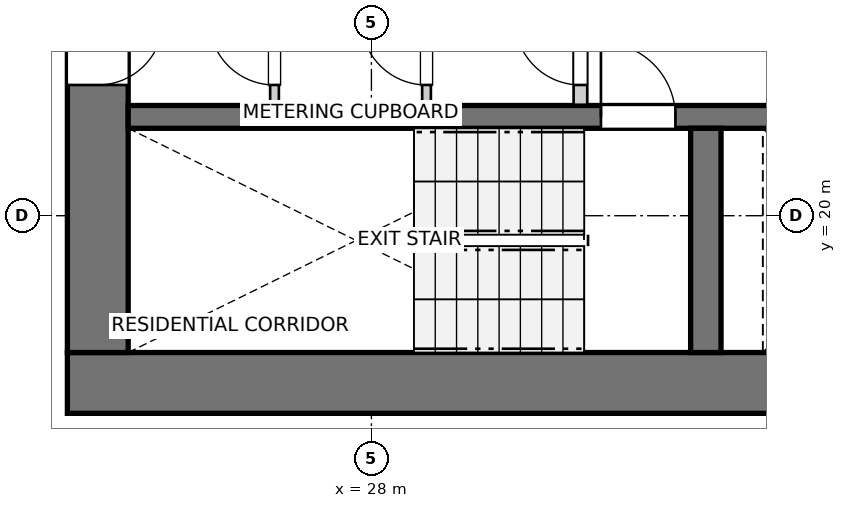
"""IFC4 building model, lengths in metres.
Left out: names, types, materials, properties, quantities, classifications, styles, units other than length and angle.
Written with IfcOpenShell. Run it as: python <this file> out.ifc"""

import sys

from ifc_helpers import new_model, si_unit, direction, frame, frame_2d, origin, place, context, subcontext, project, spatial, rectangle, extrude, source, transform, mapped, element, fill, save


model = new_model("IFC4")
c1 = context("Model", 3, precision=1e-05, world=origin(), true_north=direction((0.0, 1.0)))
c2 = subcontext(c1, "Body", "Model", "MODEL_VIEW")
j1 = project(units=[si_unit("LENGTHUNIT", "METRE"), si_unit("PLANEANGLEUNIT", "RADIAN")], contexts=[c1])
p1 = place(None, origin())
s1 = spatial("IfcSite", under=j1, at=p1, CompositionType="ELEMENT")
p2 = place(p1, origin())
s2 = spatial("IfcBuilding", under=s1, at=p2, CompositionType="ELEMENT")
p3 = place(p2, frame((0.0, 0.0, 33.4)))
s3 = spatial("IfcBuildingStorey", under=s2, at=p3, CompositionType="ELEMENT", Elevation=33.4)
p4 = place(p3, frame((24.0, 17.8, 0.0), z_axis=(0.0, 0.0, 1.0), x_axis=(1.0, 0.0, 0.0)))
e1 = element("IfcWall", 1, at=p4, inside=s3, PredefinedType="SHEAR", context=c2, shape_type="SweptSolid", body=[
    extrude(rectangle(XDim=12.7, YDim=0.8, at=frame_2d((6.35, 0.0))), origin(), (0.0, 0.0, 1.0), 2.94),
])
p5 = place(p3, frame((24.4, 33.8, 0.0), z_axis=(0.0, 0.0, 1.0), x_axis=(0.0, -1.0, 0.0)))
e2 = element("IfcWall", 2, at=p5, inside=s3, PredefinedType="SHEAR", context=c2, shape_type="SweptSolid", body=[
    extrude(rectangle(XDim=15.6, YDim=0.8, at=frame_2d((7.8, 0.0))), origin(), (0.0, 0.0, 1.0), 2.94),
])
p6 = place(p5, frame((7.05, 0.0, 0.0)))
e3 = element("IfcOpeningElement", 3, at=p6, cuts=e2, PredefinedType="OPENING", context=c2, shape_type="SweptSolid", body=[
    extrude(rectangle(XDim=1.5, YDim=2.15, at=frame_2d((0.75, 1.075))), frame((0.0, 0.41, 0.0), z_axis=(0.0, -1.0, 0.0), x_axis=(1.0, 0.0, 0.0)), (0.0, 0.0, 1.0), 0.82),
])
p7 = place(p5, frame((3.52, 0.0, 0.0)))
e4 = element("IfcOpeningElement", 4, at=p7, cuts=e2, PredefinedType="OPENING", context=c2, shape_type="SweptSolid", body=[
    extrude(rectangle(XDim=0.86, YDim=2.05, at=frame_2d((0.43, 1.025))), frame((0.0, 0.41, 0.0), z_axis=(0.0, -1.0, 0.0), x_axis=(1.0, 0.0, 0.0)), (0.0, 0.0, 1.0), 0.82),
])
p8 = place(p5, frame((11.22, 0.0, 0.0)))
e5 = element("IfcOpeningElement", 5, at=p8, cuts=e2, PredefinedType="OPENING", context=c2, shape_type="SweptSolid", body=[
    extrude(rectangle(XDim=0.86, YDim=2.05, at=frame_2d((0.43, 1.025))), frame((0.0, 0.41, 0.0), z_axis=(0.0, -1.0, 0.0), x_axis=(1.0, 0.0, 0.0)), (0.0, 0.0, 1.0), 0.82),
])
p9 = place(p3, frame((24.8, 21.3, 0.0), z_axis=(0.0, 0.0, 1.0), x_axis=(1.0, 0.0, 0.0)))
e6 = element("IfcWall", 6, at=p9, inside=s3, PredefinedType="SHEAR", context=c2, shape_type="SweptSolid", body=[
    extrude(rectangle(XDim=11.1, YDim=0.3, at=frame_2d((5.55, 0.0))), origin(), (0.0, 0.0, 1.0), 2.94),
])
p10 = place(p9, frame((6.22, 0.0, 0.0)))
e7 = element("IfcOpeningElement", 7, at=p10, cuts=e6, PredefinedType="OPENING", context=c2, shape_type="SweptSolid", body=[
    extrude(rectangle(XDim=0.98, YDim=2.15, at=frame_2d((0.49, 1.075))), frame((0.0, 0.16, 0.0), z_axis=(0.0, -1.0, 0.0), x_axis=(1.0, 0.0, 0.0)), (0.0, 0.0, 1.0), 0.32),
])
p11 = place(p9, frame((9.15, 0.0, 0.0)))
e8 = element("IfcOpeningElement", 8, at=p11, cuts=e6, PredefinedType="OPENING", context=c2, shape_type="SweptSolid", body=[
    extrude(rectangle(XDim=1.15, YDim=2.15, at=frame_2d((0.575, 1.075))), frame((0.0, 0.16, 0.0), z_axis=(0.0, -1.0, 0.0), x_axis=(1.0, 0.0, 0.0)), (0.0, 0.0, 1.0), 0.32),
])
p12 = place(p3, frame((32.4, 18.2, 0.0), z_axis=(0.0, 0.0, 1.0), x_axis=(0.0, 1.0, 0.0)))
e9 = element("IfcWall", 9, at=p12, inside=s3, PredefinedType="SHEAR", context=c2, shape_type="SweptSolid", body=[
    extrude(rectangle(XDim=2.95, YDim=0.4, at=frame_2d((1.475, 0.0))), origin(), (0.0, 0.0, 1.0), 2.94),
])
p13 = place(p3, frame((30.75, 21.46, 0.0), z_axis=(0.0, 0.0, 1.0), x_axis=(0.0, 1.0, 0.0)))
e10 = element("IfcWall", 10, at=p13, inside=s3, PredefinedType="PARTITIONING", context=c2, shape_type="SweptSolid", body=[
    extrude(rectangle(XDim=3.11, YDim=0.18, at=frame_2d((1.555, 0.0))), origin(), (0.0, 0.0, 1.0), 2.94),
])
p14 = place(p13, frame((0.26, 0.0, 0.0)))
e11 = element("IfcOpeningElement", 11, at=p14, cuts=e10, PredefinedType="OPENING", context=c2, shape_type="SweptSolid", body=[
    extrude(rectangle(XDim=0.86, YDim=2.05, at=frame_2d((0.43, 1.025))), frame((0.0, 0.1, 0.0), z_axis=(0.0, -1.0, 0.0), x_axis=(1.0, 0.0, 0.0)), (0.0, 0.0, 1.0), 0.2),
])
p15 = place(p3, frame((26.725, 21.46, 0.0), z_axis=(0.0, 0.0, 1.0), x_axis=(0.0, 1.0, 0.0)))
e12 = element("IfcWall", 12, at=p15, inside=s3, PredefinedType="PARTITIONING", context=c2, shape_type="SweptSolid", body=[
    extrude(rectangle(XDim=1.38, YDim=0.115, at=frame_2d((0.69, 0.0))), origin(), (0.0, 0.0, 1.0), 2.94),
])
p16 = place(p15, frame((0.26, 0.0, 0.0)))
e13 = element("IfcOpeningElement", 13, at=p16, cuts=e12, PredefinedType="OPENING", context=c2, shape_type="SweptSolid", body=[
    extrude(rectangle(XDim=0.86, YDim=2.05, at=frame_2d((0.43, 1.025))), frame((0.0, 0.067, 0.0), z_axis=(0.0, -1.0, 0.0), x_axis=(1.0, 0.0, 0.0)), (0.0, 0.0, 1.0), 0.135),
])
p17 = place(p3, frame((28.725, 21.46, 0.0), z_axis=(0.0, 0.0, 1.0), x_axis=(0.0, 1.0, 0.0)))
e14 = element("IfcWall", 14, at=p17, inside=s3, PredefinedType="PARTITIONING", context=c2, shape_type="SweptSolid", body=[
    extrude(rectangle(XDim=1.38, YDim=0.115, at=frame_2d((0.69, 0.0))), origin(), (0.0, 0.0, 1.0), 2.94),
])
p18 = place(p17, frame((0.26, 0.0, 0.0)))
e15 = element("IfcOpeningElement", 15, at=p18, cuts=e14, PredefinedType="OPENING", context=c2, shape_type="SweptSolid", body=[
    extrude(rectangle(XDim=0.86, YDim=2.05, at=frame_2d((0.43, 1.025))), frame((0.0, 0.067, 0.0), z_axis=(0.0, -1.0, 0.0), x_axis=(1.0, 0.0, 0.0)), (0.0, 0.0, 1.0), 0.135),
])
m1 = source(origin(), c2, "Body", "SweptSolid", [
    extrude(rectangle(XDim=0.98, YDim=2.15, at=frame_2d((0.49, 1.075))), frame((0.0, 0.025, 0.0), z_axis=(0.0, -1.0, 0.0), x_axis=(1.0, 0.0, 0.0)), (0.0, 0.0, 1.0), 0.05),
])
p19 = place(p10, origin())
e16 = element("IfcDoor", 16, at=p19, inside=s3, OperationType="SINGLE_SWING_LEFT", PredefinedType="DOOR", context=c2, shape_type="MappedRepresentation", body=[
    mapped(m1, transform((0.0, 0.0, 0.0), x_axis=(1.0, 0.0, 0.0), y_axis=(0.0, 1.0, 0.0), z_axis=(0.0, 0.0, 1.0), scale=1.0)),
])
fill(e7, e16)
m2 = source(origin(), c2, "Body", "SweptSolid", [
    extrude(rectangle(XDim=0.86, YDim=2.05, at=frame_2d((0.43, 1.025))), frame((0.0, 0.025, 0.0), z_axis=(0.0, -1.0, 0.0), x_axis=(1.0, 0.0, 0.0)), (0.0, 0.0, 1.0), 0.05),
])
p20 = place(p8, origin())
e17 = element("IfcDoor", 17, at=p20, inside=s3, OperationType="SINGLE_SWING_LEFT", PredefinedType="DOOR", context=c2, shape_type="MappedRepresentation", body=[
    mapped(m2, transform((0.0, 0.0, 0.0), x_axis=(1.0, 0.0, 0.0), y_axis=(0.0, 1.0, 0.0), z_axis=(0.0, 0.0, 1.0), scale=1.0)),
])
fill(e5, e17)
p21 = place(p14, origin())
e18 = element("IfcDoor", 18, at=p21, inside=s3, OperationType="SINGLE_SWING_RIGHT", PredefinedType="DOOR", context=c2, shape_type="MappedRepresentation", body=[
    mapped(m2, transform((0.0, 0.0, 0.0), x_axis=(1.0, 0.0, 0.0), y_axis=(0.0, 1.0, 0.0), z_axis=(0.0, 0.0, 1.0), scale=1.0)),
])
fill(e11, e18)
p22 = place(p16, origin())
e19 = element("IfcDoor", 19, at=p22, inside=s3, OperationType="SINGLE_SWING_RIGHT", PredefinedType="DOOR", context=c2, shape_type="MappedRepresentation", body=[
    mapped(m2, transform((0.0, 0.0, 0.0), x_axis=(1.0, 0.0, 0.0), y_axis=(0.0, 1.0, 0.0), z_axis=(0.0, 0.0, 1.0), scale=1.0)),
])
fill(e13, e19)
p23 = place(p18, origin())
e20 = element("IfcDoor", 20, at=p23, inside=s3, OperationType="SINGLE_SWING_RIGHT", PredefinedType="DOOR", context=c2, shape_type="MappedRepresentation", body=[
    mapped(m2, transform((0.0, 0.0, 0.0), x_axis=(1.0, 0.0, 0.0), y_axis=(0.0, 1.0, 0.0), z_axis=(0.0, 0.0, 1.0), scale=1.0)),
])
fill(e15, e20)
save(model, sys.argv[1])
